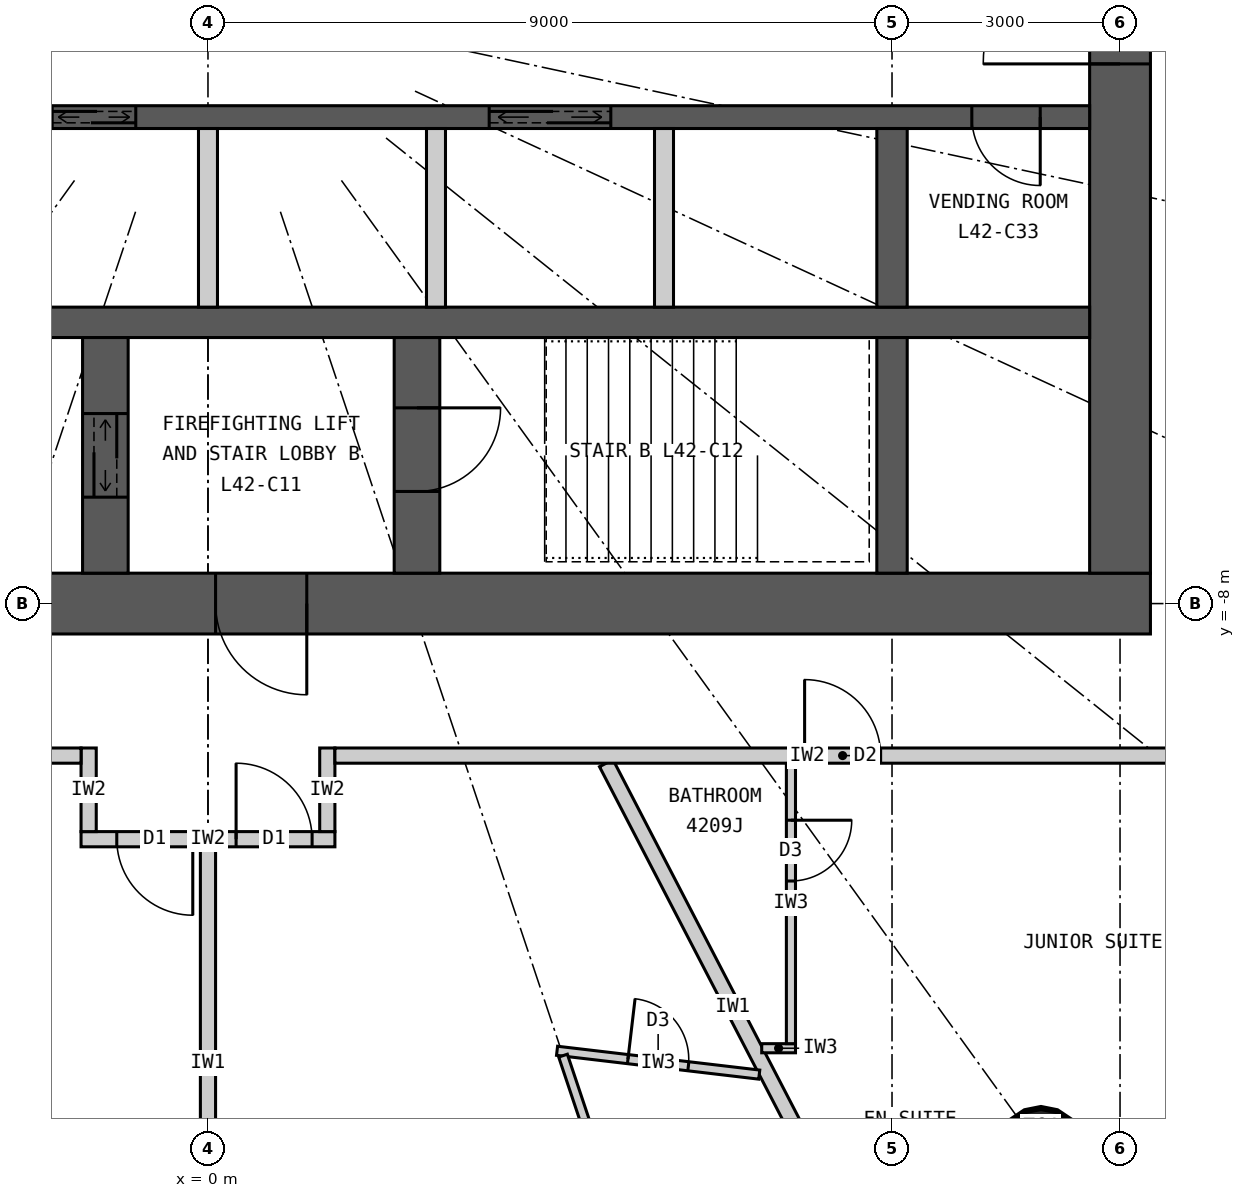
"""IFC4 building model, lengths in metres.
Left out: names, types, materials, properties, quantities, classifications, styles, units other than length and angle.
Written with IfcOpenShell. Run it as: python <this file> out.ifc"""

import sys

from ifc_helpers import new_model, si_unit, direction, frame, frame_2d, origin, origin_2d, place, context, subcontext, project, spatial, rectangle, circle, extrude, element, fill, save


model = new_model("IFC4")
c1 = context("Model", 3, precision=1e-05, world=origin(), true_north=direction((0.0, 1.0)))
c2 = subcontext(c1, "Body", "Model", "MODEL_VIEW")
j1 = project(units=[si_unit("LENGTHUNIT", "METRE"), si_unit("PLANEANGLEUNIT", "RADIAN")], contexts=[c1])
p1 = place(None, origin())
s1 = spatial("IfcSite", under=j1, at=p1, CompositionType="ELEMENT")
p2 = place(p1, origin())
s2 = spatial("IfcBuilding", under=s1, at=p2, CompositionType="ELEMENT")
p3 = place(p2, frame((0.0, 0.0, 159.9)))
s3 = spatial("IfcBuildingStorey", under=s2, at=p3, CompositionType="ELEMENT", Elevation=159.9)
p4 = place(p3, frame((10.96, -15.186, 0.0), z_axis=(0.0, 0.0, 1.0), x_axis=(1.0, 0.0, 0.0)))
e1 = element("IfcColumn", 1, at=p4, inside=s3, PredefinedType="COLUMN", context=c2, shape_type="SweptSolid", body=[
    extrude(circle(Radius=0.55, at=origin_2d()), origin(), (0.0, 0.0, 1.0), 3.3),
])
p5 = place(p3, frame((12.4, -8.0, 0.0), z_axis=(0.0, 0.0, 1.0), x_axis=(-1.0, 0.0, 0.0)))
e2 = element("IfcWall", 2, at=p5, inside=s3, PredefinedType="SHEAR", context=c2, shape_type="SweptSolid", body=[
    extrude(rectangle(XDim=24.8, YDim=0.8, at=frame_2d((12.4, 0.0))), origin(), (0.0, 0.0, 1.0), 3.3),
])
p6 = place(p5, frame((11.1, 0.0, 0.0)))
e3 = element("IfcOpeningElement", 3, at=p6, cuts=e2, PredefinedType="OPENING", context=c2, shape_type="SweptSolid", body=[
    extrude(rectangle(XDim=1.2, YDim=2.2, at=frame_2d((0.6, 1.1))), frame((0.0, 0.41, 0.0), z_axis=(0.0, -1.0, 0.0), x_axis=(1.0, 0.0, 0.0)), (0.0, 0.0, 1.0), 0.82),
])
p7 = place(p5, frame((18.7, 0.0, 0.0)))
e4 = element("IfcOpeningElement", 4, at=p7, cuts=e2, PredefinedType="OPENING", context=c2, shape_type="SweptSolid", body=[
    extrude(rectangle(XDim=0.9, YDim=2.2, at=frame_2d((0.45, 1.1))), frame((0.0, 0.41, 0.0), z_axis=(0.0, -1.0, 0.0), x_axis=(1.0, 0.0, 0.0)), (0.0, 0.0, 1.0), 0.82),
])
p8 = place(p3, frame((12.0, -7.6, 0.0), z_axis=(0.0, 0.0, 1.0), x_axis=(0.0, 1.0, 0.0)))
e5 = element("IfcWall", 5, at=p8, inside=s3, PredefinedType="SHEAR", context=c2, shape_type="SweptSolid", body=[
    extrude(rectangle(XDim=15.2, YDim=0.8, at=frame_2d((7.6, 0.0))), origin(), (0.0, 0.0, 1.0), 3.3),
])
p9 = place(p8, frame((6.7, 0.0, 0.0)))
e6 = element("IfcOpeningElement", 6, at=p9, cuts=e5, PredefinedType="OPENING", context=c2, shape_type="SweptSolid", body=[
    extrude(rectangle(XDim=1.8, YDim=2.2, at=frame_2d((0.9, 1.1))), frame((0.0, 0.41, 0.0), z_axis=(0.0, -1.0, 0.0), x_axis=(1.0, 0.0, 0.0)), (0.0, 0.0, 1.0), 0.82),
])
p10 = place(p3, frame((-11.6, -4.3, 0.0), z_axis=(0.0, 0.0, 1.0), x_axis=(1.0, 0.0, 0.0)))
e7 = element("IfcWall", 7, at=p10, inside=s3, PredefinedType="SHEAR", context=c2, shape_type="SweptSolid", body=[
    extrude(rectangle(XDim=23.2, YDim=0.4, at=frame_2d((11.6, 0.0))), origin(), (0.0, 0.0, 1.0), 3.3),
])
p11 = place(p3, frame((-11.6, -1.6, 0.0), z_axis=(0.0, 0.0, 1.0), x_axis=(1.0, 0.0, 0.0)))
e8 = element("IfcWall", 8, at=p11, inside=s3, PredefinedType="SHEAR", context=c2, shape_type="SweptSolid", body=[
    extrude(rectangle(XDim=23.2, YDim=0.3, at=frame_2d((11.6, 0.0))), origin(), (0.0, 0.0, 1.0), 3.3),
])
p12 = place(p11, frame((9.55, 0.0, 0.0)))
e9 = element("IfcOpeningElement", 9, at=p12, cuts=e8, PredefinedType="OPENING", context=c2, shape_type="SweptSolid", body=[
    extrude(rectangle(XDim=1.1, YDim=2.2, at=frame_2d((0.55, 1.1))), frame((0.0, 0.16, 0.0), z_axis=(0.0, -1.0, 0.0), x_axis=(1.0, 0.0, 0.0)), (0.0, 0.0, 1.0), 0.32),
])
p13 = place(p11, frame((15.3, 0.0, 0.0)))
e10 = element("IfcOpeningElement", 10, at=p13, cuts=e8, PredefinedType="OPENING", context=c2, shape_type="SweptSolid", body=[
    extrude(rectangle(XDim=1.6, YDim=2.4, at=frame_2d((0.8, 1.2))), frame((0.0, 0.16, 0.0), z_axis=(0.0, -1.0, 0.0), x_axis=(1.0, 0.0, 0.0)), (0.0, 0.0, 1.0), 0.32),
])
p14 = place(p11, frame((0.65, 0.0, 0.0)))
e11 = element("IfcOpeningElement", 11, at=p14, cuts=e8, PredefinedType="OPENING", context=c2, shape_type="SweptSolid", body=[
    extrude(rectangle(XDim=0.9, YDim=2.2, at=frame_2d((0.45, 1.1))), frame((0.0, 0.16, 0.0), z_axis=(0.0, -1.0, 0.0), x_axis=(1.0, 0.0, 0.0)), (0.0, 0.0, 1.0), 0.32),
])
p15 = place(p11, frame((5.15, 0.0, 0.0)))
e12 = element("IfcOpeningElement", 12, at=p15, cuts=e8, PredefinedType="OPENING", context=c2, shape_type="SweptSolid", body=[
    extrude(rectangle(XDim=0.9, YDim=2.2, at=frame_2d((0.45, 1.1))), frame((0.0, 0.16, 0.0), z_axis=(0.0, -1.0, 0.0), x_axis=(1.0, 0.0, 0.0)), (0.0, 0.0, 1.0), 0.32),
])
p16 = place(p11, frame((21.65, 0.0, 0.0)))
e13 = element("IfcOpeningElement", 13, at=p16, cuts=e8, PredefinedType="OPENING", context=c2, shape_type="SweptSolid", body=[
    extrude(rectangle(XDim=0.9, YDim=2.2, at=frame_2d((0.45, 1.1))), frame((0.0, 0.16, 0.0), z_axis=(0.0, -1.0, 0.0), x_axis=(1.0, 0.0, 0.0)), (0.0, 0.0, 1.0), 0.32),
])
p17 = place(p3, frame((9.0, -4.1, 0.0), z_axis=(0.0, 0.0, 1.0), x_axis=(0.0, 1.0, 0.0)))
e14 = element("IfcWall", 14, at=p17, inside=s3, PredefinedType="SHEAR", context=c2, shape_type="SweptSolid", body=[
    extrude(rectangle(XDim=2.35, YDim=0.4, at=frame_2d((1.175, 0.0))), origin(), (0.0, 0.0, 1.0), 3.3),
])
p18 = place(p3, frame((9.0, -7.6, 0.0), z_axis=(0.0, 0.0, 1.0), x_axis=(0.0, 1.0, 0.0)))
e15 = element("IfcWall", 15, at=p18, inside=s3, PredefinedType="SHEAR", context=c2, shape_type="SweptSolid", body=[
    extrude(rectangle(XDim=3.1, YDim=0.4, at=frame_2d((1.55, 0.0))), origin(), (0.0, 0.0, 1.0), 3.3),
])
p19 = place(p3, frame((2.75, -7.6, 0.0), z_axis=(0.0, 0.0, 1.0), x_axis=(0.0, 1.0, 0.0)))
e16 = element("IfcWall", 16, at=p19, inside=s3, PredefinedType="SHEAR", context=c2, shape_type="SweptSolid", body=[
    extrude(rectangle(XDim=3.1, YDim=0.6, at=frame_2d((1.55, 0.0))), origin(), (0.0, 0.0, 1.0), 3.3),
])
p20 = place(p19, frame((1.075, 0.0, 0.0)))
e17 = element("IfcOpeningElement", 17, at=p20, cuts=e16, PredefinedType="OPENING", context=c2, shape_type="SweptSolid", body=[
    extrude(rectangle(XDim=1.1, YDim=2.2, at=frame_2d((0.55, 1.1))), frame((0.0, 0.31, 0.0), z_axis=(0.0, -1.0, 0.0), x_axis=(1.0, 0.0, 0.0)), (0.0, 0.0, 1.0), 0.62),
])
p21 = place(p3, frame((-1.35, -7.6, 0.0), z_axis=(0.0, 0.0, 1.0), x_axis=(0.0, 1.0, 0.0)))
e18 = element("IfcWall", 18, at=p21, inside=s3, PredefinedType="SHEAR", context=c2, shape_type="SweptSolid", body=[
    extrude(rectangle(XDim=3.1, YDim=0.6, at=frame_2d((1.55, 0.0))), origin(), (0.0, 0.0, 1.0), 3.3),
])
p22 = place(p21, frame((1.0, 0.0, 0.0)))
e19 = element("IfcOpeningElement", 19, at=p22, cuts=e18, PredefinedType="OPENING", context=c2, shape_type="SweptSolid", body=[
    extrude(rectangle(XDim=1.1, YDim=2.2, at=frame_2d((0.55, 1.1))), frame((0.0, 0.31, 0.0), z_axis=(0.0, -1.0, 0.0), x_axis=(1.0, 0.0, 0.0)), (0.0, 0.0, 1.0), 0.62),
])
for number, where, z_axis, x_axis in (
    (20, (0.0, -4.1, 0.0), (0.0, 0.0, 1.0), (0.0, 1.0, 0.0)),
    (21, (3.0, -4.1, 0.0), (0.0, 0.0, 1.0), (0.0, 1.0, 0.0)),
    (22, (6.0, -4.1, 0.0), (0.0, 0.0, 1.0), (0.0, 1.0, 0.0)),
):
    element("IfcWall", number, at=place(p3, frame(where, z_axis=z_axis, x_axis=x_axis)), inside=s3, PredefinedType="PARTITIONING", context=c2, shape_type="SweptSolid", body=[
        extrude(rectangle(XDim=2.35, YDim=0.25, at=frame_2d((1.175, 0.0))), origin(), (0.0, 0.0, 1.0), 3.3),
    ])
p23 = place(p3, frame((11.346, -15.722, 0.0), z_axis=(0.0, 0.0, 1.0), x_axis=(0.857695199231, 0.514158482587, 0.0)))
e23 = element("IfcWall", 23, at=p23, inside=s3, PredefinedType="ELEMENTEDWALL", context=c2, shape_type="SweptSolid", body=[
    extrude(rectangle(XDim=5.536, YDim=0.15, at=frame_2d((2.768, 0.0))), origin(), (0.0, 0.0, 1.0), 3.12),
])
p24 = place(p23, frame((1.068, 0.0, 0.9)))
e24 = element("IfcOpeningElement", 24, at=p24, cuts=e23, PredefinedType="OPENING", context=c2, shape_type="SweptSolid", body=[
    extrude(rectangle(XDim=1.4, YDim=1.9, at=frame_2d((0.7, 0.95))), frame((0.0, 0.085, 0.0), z_axis=(0.0, -1.0, 0.0), x_axis=(1.0, 0.0, 0.0)), (0.0, 0.0, 1.0), 0.17),
])
p25 = place(p23, frame((3.068, 0.0, 0.9)))
e25 = element("IfcOpeningElement", 25, at=p25, cuts=e23, PredefinedType="OPENING", context=c2, shape_type="SweptSolid", body=[
    extrude(rectangle(XDim=1.4, YDim=1.9, at=frame_2d((0.7, 0.95))), frame((0.0, 0.085, 0.0), z_axis=(0.0, -1.0, 0.0), x_axis=(1.0, 0.0, 0.0)), (0.0, 0.0, 1.0), 0.17),
])
p26 = place(p3, frame((0.0, -11.2, 0.0), z_axis=(0.0, 0.0, 1.0), x_axis=(0.0, -1.0, 0.0)))
e26 = element("IfcWall", 26, at=p26, inside=s3, PredefinedType="PARTITIONING", context=c2, shape_type="SweptSolid", body=[
    extrude(rectangle(XDim=5.7, YDim=0.2, at=frame_2d((2.85, 0.0))), origin(), (0.0, 0.0, 1.0), 2.42),
])
p27 = place(p3, frame((5.24, -10.1, 0.0), z_axis=(0.0, 0.0, 1.0), x_axis=(0.460532965373, -0.887642601391, 0.0)))
e27 = element("IfcWall", 27, at=p27, inside=s3, PredefinedType="PARTITIONING", context=c2, shape_type="SweptSolid", body=[
    extrude(rectangle(XDim=7.231, YDim=0.2, at=frame_2d((3.616, 0.0))), origin(), (0.0, 0.0, 1.0), 3.12),
])
p28 = place(p3, frame((1.67, -11.1, 0.0), z_axis=(0.0, 0.0, 1.0), x_axis=(-1.0, 0.0, 0.0)))
e28 = element("IfcWall", 28, at=p28, inside=s3, PredefinedType="PARTITIONING", context=c2, shape_type="SweptSolid", body=[
    extrude(rectangle(XDim=3.34, YDim=0.2, at=frame_2d((1.67, 0.0))), origin(), (0.0, 0.0, 1.0), 3.12),
])
p29 = place(p28, frame((1.87, 0.0, 0.0)))
e29 = element("IfcOpeningElement", 29, at=p29, cuts=e28, PredefinedType="OPENING", context=c2, shape_type="SweptSolid", body=[
    extrude(rectangle(XDim=1.0, YDim=2.2, at=frame_2d((0.5, 1.1))), frame((0.0, 0.11, 0.0), z_axis=(0.0, -1.0, 0.0), x_axis=(1.0, 0.0, 0.0)), (0.0, 0.0, 1.0), 0.22),
])
p30 = place(p28, frame((0.3, 0.0, 0.0)))
e30 = element("IfcOpeningElement", 30, at=p30, cuts=e28, PredefinedType="OPENING", context=c2, shape_type="SweptSolid", body=[
    extrude(rectangle(XDim=1.0, YDim=2.2, at=frame_2d((0.5, 1.1))), frame((0.0, 0.11, 0.0), z_axis=(0.0, -1.0, 0.0), x_axis=(1.0, 0.0, 0.0)), (0.0, 0.0, 1.0), 0.22),
])
for number, where, z_axis, x_axis in (
    (31, (1.57, -9.9, 0.0), (0.0, 0.0, 1.0), (0.0, -1.0, 0.0)),
    (32, (-1.57, -9.9, 0.0), (0.0, 0.0, 1.0), (0.0, -1.0, 0.0)),
):
    element("IfcWall", number, at=place(p3, frame(where, z_axis=z_axis, x_axis=x_axis)), inside=s3, PredefinedType="PARTITIONING", context=c2, shape_type="SweptSolid", body=[
        extrude(rectangle(XDim=1.1, YDim=0.2, at=frame_2d((0.55, 0.0))), origin(), (0.0, 0.0, 1.0), 3.12),
    ])
p31 = place(p3, frame((7.253, -14.197, 0.0), z_axis=(0.0, 0.0, 1.0), x_axis=(-0.993128188393, 0.117031625725, 0.0)))
e33 = element("IfcWall", 33, at=p31, inside=s3, PredefinedType="PARTITIONING", context=c2, shape_type="SweptSolid", body=[
    extrude(rectangle(XDim=2.678, YDim=0.12, at=frame_2d((1.339, 0.0))), origin(), (0.0, 0.0, 1.0), 3.12),
])
p32 = place(p31, frame((0.939, 0.0, 0.0)))
e34 = element("IfcOpeningElement", 34, at=p32, cuts=e33, PredefinedType="OPENING", context=c2, shape_type="SweptSolid", body=[
    extrude(rectangle(XDim=0.8, YDim=2.1, at=frame_2d((0.4, 1.05))), frame((0.0, 0.07, 0.0), z_axis=(0.0, -1.0, 0.0), x_axis=(1.0, 0.0, 0.0)), (0.0, 0.0, 1.0), 0.14),
])
p33 = place(p3, frame((4.671, -13.948, 0.0), z_axis=(0.0, 0.0, 1.0), x_axis=(0.317669167093, -0.948201613729, 0.0)))
e35 = element("IfcWall", 35, at=p33, inside=s3, PredefinedType="PARTITIONING", context=c2, shape_type="SweptSolid", body=[
    extrude(rectangle(XDim=2.54, YDim=0.12, at=frame_2d((1.27, 0.0))), origin(), (0.0, 0.0, 1.0), 2.42),
])
p34 = place(p3, frame((7.286, -13.85, 0.0), z_axis=(0.0, 0.0, 1.0), x_axis=(1.0, 0.0, 0.0)))
e36 = element("IfcWall", 36, at=p34, inside=s3, PredefinedType="PARTITIONING", context=c2, shape_type="SweptSolid", body=[
    extrude(rectangle(XDim=0.444, YDim=0.12, at=frame_2d((0.222, 0.0))), origin(), (0.0, 0.0, 1.0), 3.12),
])
p35 = place(p3, frame((7.67, -10.1, 0.0), z_axis=(0.0, 0.0, 1.0), x_axis=(0.0, -1.0, 0.0)))
e37 = element("IfcWall", 37, at=p35, inside=s3, PredefinedType="PARTITIONING", context=c2, shape_type="SweptSolid", body=[
    extrude(rectangle(XDim=3.69, YDim=0.12, at=frame_2d((1.845, 0.0))), origin(), (0.0, 0.0, 1.0), 3.12),
])
p36 = place(p35, frame((0.75, 0.0, 0.0)))
e38 = element("IfcOpeningElement", 38, at=p36, cuts=e37, PredefinedType="OPENING", context=c2, shape_type="SweptSolid", body=[
    extrude(rectangle(XDim=0.8, YDim=2.1, at=frame_2d((0.4, 1.05))), frame((0.0, 0.07, 0.0), z_axis=(0.0, -1.0, 0.0), x_axis=(1.0, 0.0, 0.0)), (0.0, 0.0, 1.0), 0.14),
])
p37 = place(p3, frame((14.1, -10.0, 0.0), z_axis=(0.0, 0.0, 1.0), x_axis=(-1.0, 0.0, 0.0)))
e39 = element("IfcWall", 39, at=p37, inside=s3, PredefinedType="PARTITIONING", context=c2, shape_type="SweptSolid", body=[
    extrude(rectangle(XDim=12.43, YDim=0.2, at=frame_2d((6.215, 0.0))), origin(), (0.0, 0.0, 1.0), 3.12),
])
p38 = place(p37, frame((5.25, 0.0, 0.0)))
e40 = element("IfcOpeningElement", 40, at=p38, cuts=e39, PredefinedType="OPENING", context=c2, shape_type="SweptSolid", body=[
    extrude(rectangle(XDim=1.0, YDim=2.2, at=frame_2d((0.5, 1.1))), frame((0.0, 0.11, 0.0), z_axis=(0.0, -1.0, 0.0), x_axis=(1.0, 0.0, 0.0)), (0.0, 0.0, 1.0), 0.22),
])
p39 = place(p3, frame((-1.67, -10.0, 0.0), z_axis=(0.0, 0.0, 1.0), x_axis=(-1.0, 0.0, 0.0)))
e41 = element("IfcWall", 41, at=p39, inside=s3, PredefinedType="PARTITIONING", context=c2, shape_type="SweptSolid", body=[
    extrude(rectangle(XDim=12.43, YDim=0.2, at=frame_2d((6.215, 0.0))), origin(), (0.0, 0.0, 1.0), 3.12),
])
p40 = place(p39, frame((9.655, 0.0, 0.0)))
e42 = element("IfcOpeningElement", 42, at=p40, cuts=e41, PredefinedType="OPENING", context=c2, shape_type="SweptSolid", body=[
    extrude(rectangle(XDim=1.0, YDim=2.2, at=frame_2d((0.5, 1.1))), frame((0.0, 0.11, 0.0), z_axis=(0.0, -1.0, 0.0), x_axis=(1.0, 0.0, 0.0)), (0.0, 0.0, 1.0), 0.22),
])
p41 = place(p24, origin())
e43 = element("IfcWindow", 43, at=p41, inside=s3, PartitioningType="SINGLE_PANEL", PredefinedType="WINDOW", context=c2, shape_type="SweptSolid", body=[
    extrude(rectangle(XDim=1.4, YDim=1.9, at=frame_2d((0.7, 0.95))), frame((0.0, 0.03, 0.0), z_axis=(0.0, -1.0, 0.0), x_axis=(1.0, 0.0, 0.0)), (0.0, 0.0, 1.0), 0.06),
])
fill(e24, e43)
p42 = place(p29, origin())
e44 = element("IfcDoor", 44, at=p42, inside=s3, OperationType="SINGLE_SWING_LEFT", PredefinedType="DOOR", context=c2, shape_type="SweptSolid", body=[
    extrude(rectangle(XDim=1.0, YDim=2.2, at=frame_2d((0.5, 1.1))), frame((0.0, 0.025, 0.0), z_axis=(0.0, -1.0, 0.0), x_axis=(1.0, 0.0, 0.0)), (0.0, 0.0, 1.0), 0.05),
])
fill(e29, e44)
p43 = place(p32, origin())
e45 = element("IfcDoor", 45, at=p43, inside=s3, OperationType="SINGLE_SWING_RIGHT", PredefinedType="DOOR", context=c2, shape_type="SweptSolid", body=[
    extrude(rectangle(XDim=0.8, YDim=2.1, at=frame_2d((0.4, 1.05))), frame((0.0, 0.025, 0.0), z_axis=(0.0, -1.0, 0.0), x_axis=(1.0, 0.0, 0.0)), (0.0, 0.0, 1.0), 0.05),
])
fill(e34, e45)
p44 = place(p30, origin())
e46 = element("IfcDoor", 46, at=p44, inside=s3, OperationType="SINGLE_SWING_RIGHT", PredefinedType="DOOR", context=c2, shape_type="SweptSolid", body=[
    extrude(rectangle(XDim=1.0, YDim=2.2, at=frame_2d((0.5, 1.1))), frame((0.0, 0.025, 0.0), z_axis=(0.0, -1.0, 0.0), x_axis=(1.0, 0.0, 0.0)), (0.0, 0.0, 1.0), 0.05),
])
fill(e30, e46)
p45 = place(p36, origin())
e47 = element("IfcDoor", 47, at=p45, inside=s3, OperationType="SINGLE_SWING_LEFT", PredefinedType="DOOR", context=c2, shape_type="SweptSolid", body=[
    extrude(rectangle(XDim=0.8, YDim=2.1, at=frame_2d((0.4, 1.05))), frame((0.0, 0.025, 0.0), z_axis=(0.0, -1.0, 0.0), x_axis=(1.0, 0.0, 0.0)), (0.0, 0.0, 1.0), 0.05),
])
fill(e38, e47)
p46 = place(p38, origin())
e48 = element("IfcDoor", 48, at=p46, inside=s3, OperationType="SINGLE_SWING_RIGHT", PredefinedType="DOOR", context=c2, shape_type="SweptSolid", body=[
    extrude(rectangle(XDim=1.0, YDim=2.2, at=frame_2d((0.5, 1.1))), frame((0.0, 0.025, 0.0), z_axis=(0.0, -1.0, 0.0), x_axis=(1.0, 0.0, 0.0)), (0.0, 0.0, 1.0), 0.05),
])
fill(e40, e48)
p47 = place(p6, origin())
e49 = element("IfcDoor", 49, at=p47, inside=s3, OperationType="SINGLE_SWING_LEFT", PredefinedType="DOOR", context=c2, shape_type="SweptSolid", body=[
    extrude(rectangle(XDim=1.2, YDim=2.2, at=frame_2d((0.6, 1.1))), frame((0.0, 0.025, 0.0), z_axis=(0.0, -1.0, 0.0), x_axis=(1.0, 0.0, 0.0)), (0.0, 0.0, 1.0), 0.05),
])
fill(e3, e49)
p48 = place(p20, origin())
e50 = element("IfcDoor", 50, at=p48, inside=s3, OperationType="SINGLE_SWING_RIGHT", PredefinedType="DOOR", context=c2, shape_type="SweptSolid", body=[
    extrude(rectangle(XDim=1.1, YDim=2.2, at=frame_2d((0.55, 1.1))), frame((0.0, 0.025, 0.0), z_axis=(0.0, -1.0, 0.0), x_axis=(1.0, 0.0, 0.0)), (0.0, 0.0, 1.0), 0.05),
])
fill(e17, e50)
p49 = place(p22, origin())
e51 = element("IfcDoor", 51, at=p49, inside=s3, OperationType="DOUBLE_DOOR_SLIDING", PredefinedType="DOOR", context=c2, shape_type="SweptSolid", body=[
    extrude(rectangle(XDim=1.1, YDim=2.2, at=frame_2d((0.55, 1.1))), frame((0.0, 0.025, 0.0), z_axis=(0.0, -1.0, 0.0), x_axis=(1.0, 0.0, 0.0)), (0.0, 0.0, 1.0), 0.05),
])
fill(e19, e51)
p50 = place(p12, origin())
e52 = element("IfcDoor", 52, at=p50, inside=s3, OperationType="DOUBLE_DOOR_SLIDING", PredefinedType="DOOR", context=c2, shape_type="SweptSolid", body=[
    extrude(rectangle(XDim=1.1, YDim=2.2, at=frame_2d((0.55, 1.1))), frame((0.0, 0.025, 0.0), z_axis=(0.0, -1.0, 0.0), x_axis=(1.0, 0.0, 0.0)), (0.0, 0.0, 1.0), 0.05),
])
fill(e9, e52)
p51 = place(p13, origin())
e53 = element("IfcDoor", 53, at=p51, inside=s3, OperationType="DOUBLE_DOOR_SLIDING", PredefinedType="DOOR", context=c2, shape_type="SweptSolid", body=[
    extrude(rectangle(XDim=1.6, YDim=2.4, at=frame_2d((0.8, 1.2))), frame((0.0, 0.025, 0.0), z_axis=(0.0, -1.0, 0.0), x_axis=(1.0, 0.0, 0.0)), (0.0, 0.0, 1.0), 0.05),
])
fill(e10, e53)
p52 = place(p16, origin())
e54 = element("IfcDoor", 54, at=p52, inside=s3, OperationType="SINGLE_SWING_RIGHT", PredefinedType="DOOR", context=c2, shape_type="SweptSolid", body=[
    extrude(rectangle(XDim=0.9, YDim=2.2, at=frame_2d((0.45, 1.1))), frame((0.0, 0.025, 0.0), z_axis=(0.0, -1.0, 0.0), x_axis=(1.0, 0.0, 0.0)), (0.0, 0.0, 1.0), 0.05),
])
fill(e13, e54)
p53 = place(p9, origin())
e55 = element("IfcDoor", 55, at=p53, inside=s3, OperationType="DOUBLE_DOOR_DOUBLE_SWING", PredefinedType="DOOR", context=c2, shape_type="SweptSolid", body=[
    extrude(rectangle(XDim=1.8, YDim=2.2, at=frame_2d((0.9, 1.1))), frame((0.0, 0.025, 0.0), z_axis=(0.0, -1.0, 0.0), x_axis=(1.0, 0.0, 0.0)), (0.0, 0.0, 1.0), 0.05),
])
fill(e6, e55)
save(model, sys.argv[1])
